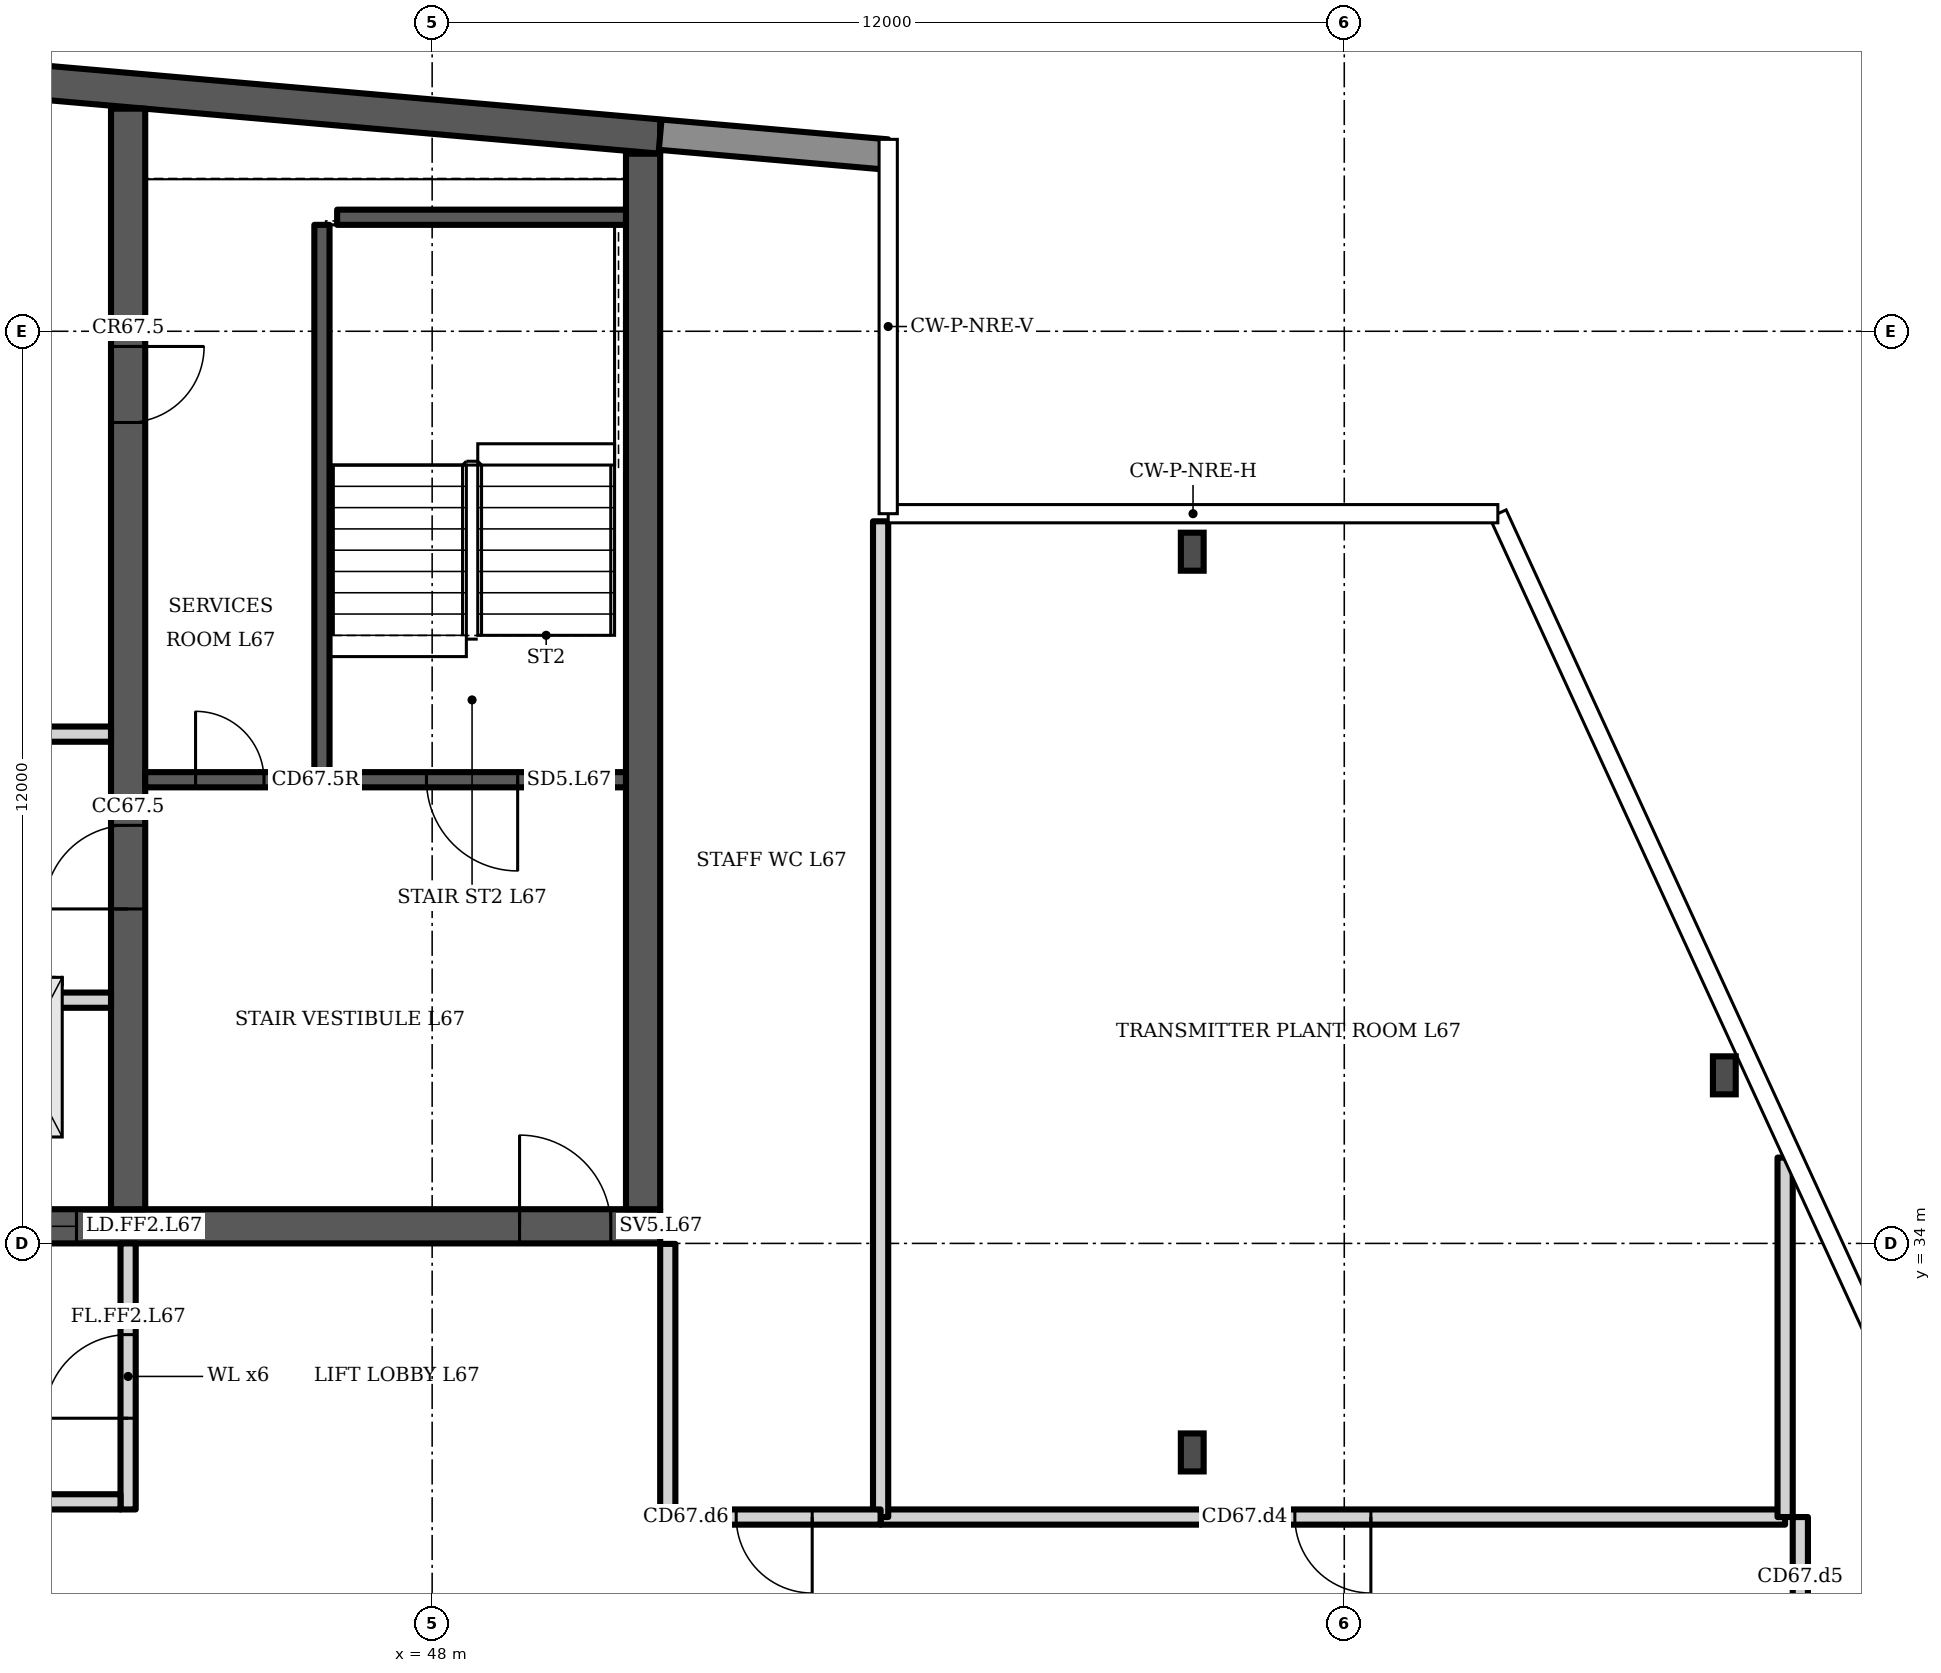
"""IFC4 building model, lengths in metres.
Left out: names, types, materials, properties, quantities, classifications, styles, units other than length and angle.
Written with IfcOpenShell. Run it as: python <this file> out.ifc"""

import sys

from ifc_helpers import new_model, si_unit, direction, frame, frame_2d, origin, origin_2d, place, context, subcontext, project, spatial, polyline, rectangle, i_section, outline, extrude, element, fill, save


model = new_model("IFC4")
c1 = context("Model", 3, precision=1e-05, world=origin(), true_north=direction((0.0, 1.0)))
c2 = subcontext(c1, "Body", "Model", "MODEL_VIEW")
j1 = project(units=[si_unit("LENGTHUNIT", "METRE"), si_unit("PLANEANGLEUNIT", "RADIAN")], contexts=[c1])
p1 = place(None, origin())
s1 = spatial("IfcSite", under=j1, at=p1, CompositionType="ELEMENT")
p2 = place(p1, origin())
s2 = spatial("IfcBuilding", under=s1, at=p2, CompositionType="ELEMENT")
p3 = place(p2, frame((0.0, 0.0, 264.3)))
s3 = spatial("IfcBuildingStorey", under=s2, at=p3, CompositionType="ELEMENT", Elevation=264.3)
p4 = place(p3, frame((0.0, 0.0, -0.0)))
e1 = element("IfcWall", 1, at=p4, inside=s3, PredefinedType="SHEAR", context=c2, shape_type="SweptSolid", body=[
    extrude(outline(polyline([(30.0, 48.948), (37.0, 49.561), (51.0, 48.336), (51.0, 48.787), (37.0, 50.012), (30.0, 49.4), (30.0, 48.948)])), origin(), (0.0, 0.0, 1.0), 1.994),
])
p5 = place(p3, frame((30.0, 34.225, 0.0), z_axis=(0.0, 0.0, 1.0), x_axis=(1.0, 0.0, 0.0)))
e2 = element("IfcWall", 2, at=p5, inside=s3, PredefinedType="SHEAR", context=c2, shape_type="SweptSolid", body=[
    extrude(outline(polyline([(0.0, 0.0), (21.0, 0.0), (21.0, 3.2), (18.375, 3.2), (15.75, 3.2), (13.125, 3.2), (10.5, 3.2), (7.875, 3.2), (5.25, 3.2), (2.625, 3.054), (0.0, 2.25), (0.0, 0.0)])), frame((0.0, 0.225, 0.0), z_axis=(0.0, -1.0, 0.0), x_axis=(1.0, 0.0, 0.0)), (0.0, 0.0, 1.0), 0.45),
])
p6 = place(p5, frame((0.792, 0.0, 0.0)))
e3 = element("IfcOpeningElement", 3, at=p6, cuts=e2, PredefinedType="OPENING", context=c2, shape_type="SweptSolid", body=[
    extrude(rectangle(XDim=1.1, YDim=2.1, at=frame_2d((0.55, 1.05))), frame((0.0, 0.235, 0.0), z_axis=(0.0, -1.0, 0.0), x_axis=(1.0, 0.0, 0.0)), (0.0, 0.0, 1.0), 0.47),
])
p7 = place(p5, frame((5.221, 0.0, 0.0)))
e4 = element("IfcOpeningElement", 4, at=p7, cuts=e2, PredefinedType="OPENING", context=c2, shape_type="SweptSolid", body=[
    extrude(rectangle(XDim=1.1, YDim=2.1, at=frame_2d((0.55, 1.05))), frame((0.0, 0.235, 0.0), z_axis=(0.0, -1.0, 0.0), x_axis=(1.0, 0.0, 0.0)), (0.0, 0.0, 1.0), 0.47),
])
p8 = place(p5, frame((2.8, 0.0, 0.0)))
e5 = element("IfcOpeningElement", 5, at=p8, cuts=e2, PredefinedType="OPENING", context=c2, shape_type="SweptSolid", body=[
    extrude(rectangle(XDim=1.4, YDim=2.1, at=frame_2d((0.7, 1.05))), frame((0.0, 0.235, 0.0), z_axis=(0.0, -1.0, 0.0), x_axis=(1.0, 0.0, 0.0)), (0.0, 0.0, 1.0), 0.47),
])
p9 = place(p5, frame((7.679, 0.0, 0.0)))
e6 = element("IfcOpeningElement", 6, at=p9, cuts=e2, PredefinedType="OPENING", context=c2, shape_type="SweptSolid", body=[
    extrude(rectangle(XDim=1.1, YDim=2.1, at=frame_2d((0.55, 1.05))), frame((0.0, 0.235, 0.0), z_axis=(0.0, -1.0, 0.0), x_axis=(1.0, 0.0, 0.0)), (0.0, 0.0, 1.0), 0.47),
])
p10 = place(p5, frame((12.221, 0.0, 0.0)))
e7 = element("IfcOpeningElement", 7, at=p10, cuts=e2, PredefinedType="OPENING", context=c2, shape_type="SweptSolid", body=[
    extrude(rectangle(XDim=1.1, YDim=2.1, at=frame_2d((0.55, 1.05))), frame((0.0, 0.235, 0.0), z_axis=(0.0, -1.0, 0.0), x_axis=(1.0, 0.0, 0.0)), (0.0, 0.0, 1.0), 0.47),
])
p11 = place(p5, frame((19.15, 0.0, 0.0)))
e8 = element("IfcOpeningElement", 8, at=p11, cuts=e2, PredefinedType="OPENING", context=c2, shape_type="SweptSolid", body=[
    extrude(rectangle(XDim=1.2, YDim=2.1, at=frame_2d((0.6, 1.05))), frame((0.0, 0.235, 0.0), z_axis=(0.0, -1.0, 0.0), x_axis=(1.0, 0.0, 0.0)), (0.0, 0.0, 1.0), 0.47),
])
p12 = place(p3, frame((44.0, 34.45, 0.0), z_axis=(0.0, 0.0, 1.0), x_axis=(0.0, 1.0, 0.0)))
e9 = element("IfcWall", 9, at=p12, inside=s3, PredefinedType="SHEAR", context=c2, shape_type="SweptSolid", body=[
    extrude(rectangle(XDim=14.479, YDim=0.45, at=frame_2d((7.239, 0.0))), origin(), (0.0, 0.0, 1.0), 3.2),
])
p13 = place(p12, frame((3.95, 0.0, 0.0)))
e10 = element("IfcOpeningElement", 10, at=p13, cuts=e9, PredefinedType="OPENING", context=c2, shape_type="SweptSolid", body=[
    extrude(rectangle(XDim=1.1, YDim=2.1, at=frame_2d((0.55, 1.05))), frame((0.0, 0.235, 0.0), z_axis=(0.0, -1.0, 0.0), x_axis=(1.0, 0.0, 0.0)), (0.0, 0.0, 1.0), 0.47),
])
p14 = place(p12, frame((10.35, 0.0, 0.0)))
e11 = element("IfcOpeningElement", 11, at=p14, cuts=e9, PredefinedType="OPENING", context=c2, shape_type="SweptSolid", body=[
    extrude(rectangle(XDim=1.0, YDim=2.1, at=frame_2d((0.5, 1.05))), frame((0.0, 0.235, 0.0), z_axis=(0.0, -1.0, 0.0), x_axis=(1.0, 0.0, 0.0)), (0.0, 0.0, 1.0), 0.47),
])
p15 = place(p3, frame((50.775, 34.45, 0.0), z_axis=(0.0, 0.0, 1.0), x_axis=(0.0, 1.0, 0.0)))
e12 = element("IfcWall", 12, at=p15, inside=s3, PredefinedType="SHEAR", context=c2, shape_type="SweptSolid", body=[
    extrude(rectangle(XDim=13.886, YDim=0.45, at=frame_2d((6.943, 0.0))), origin(), (0.0, 0.0, 1.0), 3.2),
])
for number, where, z_axis, x_axis in (
    (13, (58.0, 31.25, 0.0), (0.0, 0.0, 1.0), (1.0, 0.0, 0.0)),
    (14, (58.0, 43.1, 0.0), (0.0, 0.0, 1.0), (1.0, 0.0, 0.0)),
    (15, (65.0, 36.211, 0.0), (0.0, 0.0, 1.0), (1.0, 0.0, 0.0)),
):
    element("IfcColumn", number, at=place(p3, frame(where, z_axis=z_axis, x_axis=x_axis)), inside=s3, PredefinedType="COLUMN", context=c2, shape_type="SweptSolid", body=[
        extrude(i_section(OverallWidth=0.3, OverallDepth=0.5, WebThickness=0.014, FlangeThickness=0.028, FilletRadius=0.027, at=origin_2d()), origin(), (0.0, 0.0, 1.0), 3.2),
    ])
p16 = place(p3, frame((53.983, 48.326, 0.0), z_axis=(0.0, 0.0, 1.0), x_axis=(-0.996194, 0.087168, 0.0)))
e16 = element("IfcWall", 16, at=p16, inside=s3, PredefinedType="SOLIDWALL", context=c2, shape_type="SweptSolid", body=[
    extrude(rectangle(XDim=2.994, YDim=0.4, at=frame_2d((1.497, 0.0))), origin(), (0.0, 0.0, 1.0), 2.8),
])
p17 = place(p3, frame((37.225, 40.7, 0.0), z_axis=(0.0, 0.0, 1.0), x_axis=(1.0, 0.0, 0.0)))
e17 = element("IfcWall", 17, at=p17, inside=s3, PredefinedType="PARTITIONING", context=c2, shape_type="SweptSolid", body=[
    extrude(rectangle(XDim=6.55, YDim=0.2, at=frame_2d((3.275, 0.0))), origin(), (0.0, 0.0, 1.0), 2.8),
])
p18 = place(p17, frame((2.775, 0.0, 0.0)))
e18 = element("IfcOpeningElement", 18, at=p18, cuts=e17, PredefinedType="OPENING", context=c2, shape_type="SweptSolid", body=[
    extrude(rectangle(XDim=1.0, YDim=2.1, at=frame_2d((0.5, 1.05))), frame((0.0, 0.11, 0.0), z_axis=(0.0, -1.0, 0.0), x_axis=(1.0, 0.0, 0.0)), (0.0, 0.0, 1.0), 0.22),
])
p19 = place(p3, origin())
e19 = element("IfcWall", 19, at=p19, inside=s3, PredefinedType="PARTITIONING", context=c2, shape_type="SweptSolid", body=[
    extrude(outline(polyline([(41.567, 37.3), (41.767, 37.3), (43.775, 37.3), (43.775, 37.1), (41.767, 37.1), (41.767, 34.45), (41.567, 34.45), (41.567, 37.3)])), origin(), (0.0, 0.0, 1.0), 2.8),
])
p20 = place(p3, frame((44.225, 40.1, 0.0), z_axis=(0.0, 0.0, 1.0), x_axis=(1.0, 0.0, 0.0)))
e20 = element("IfcWall", 20, at=p20, inside=s3, PredefinedType="SHEAR", context=c2, shape_type="SweptSolid", body=[
    extrude(rectangle(XDim=6.325, YDim=0.2, at=frame_2d((3.163, 0.0))), origin(), (0.0, 0.0, 1.0), 2.8),
])
p21 = place(p20, frame((3.7, 0.0, 0.0)))
e21 = element("IfcOpeningElement", 21, at=p21, cuts=e20, PredefinedType="OPENING", context=c2, shape_type="SweptSolid", body=[
    extrude(rectangle(XDim=1.2, YDim=2.1, at=frame_2d((0.6, 1.05))), frame((0.0, 0.11, 0.0), z_axis=(0.0, -1.0, 0.0), x_axis=(1.0, 0.0, 0.0)), (0.0, 0.0, 1.0), 0.22),
])
p22 = place(p20, frame((0.663, 0.0, 0.0)))
e22 = element("IfcOpeningElement", 22, at=p22, cuts=e20, PredefinedType="OPENING", context=c2, shape_type="SweptSolid", body=[
    extrude(rectangle(XDim=0.9, YDim=2.1, at=frame_2d((0.45, 1.05))), frame((0.0, 0.11, 0.0), z_axis=(0.0, -1.0, 0.0), x_axis=(1.0, 0.0, 0.0)), (0.0, 0.0, 1.0), 0.22),
])
p23 = place(p3, frame((46.55, 40.2, 0.0), z_axis=(0.0, 0.0, 1.0), x_axis=(0.0, 1.0, 0.0)))
e23 = element("IfcWall", 23, at=p23, inside=s3, PredefinedType="SHEAR", context=c2, shape_type="SweptSolid", body=[
    extrude(rectangle(XDim=7.2, YDim=0.2, at=frame_2d((3.6, 0.0))), origin(), (0.0, 0.0, 1.0), 2.8),
])
p24 = place(p3, frame((46.75, 47.5, 0.0), z_axis=(0.0, 0.0, 1.0), x_axis=(1.0, 0.0, 0.0)))
e24 = element("IfcWall", 24, at=p24, inside=s3, PredefinedType="SHEAR", context=c2, shape_type="SweptSolid", body=[
    extrude(rectangle(XDim=3.8, YDim=0.2, at=frame_2d((1.9, 0.0))), origin(), (0.0, 0.0, 1.0), 2.8),
])
p25 = place(p3, frame((65.8, 30.4, 0.0), z_axis=(0.0, 0.0, 1.0), x_axis=(-1.0, 0.0, 0.0)))
e25 = element("IfcWall", 25, at=p25, inside=s3, PredefinedType="PARTITIONING", context=c2, shape_type="SweptSolid", body=[
    extrude(rectangle(XDim=11.9, YDim=0.2, at=frame_2d((5.95, 0.0))), origin(), (0.0, 0.0, 1.0), 2.8),
])
p26 = place(p25, frame((5.45, 0.0, 0.0)))
e26 = element("IfcOpeningElement", 26, at=p26, cuts=e25, PredefinedType="OPENING", context=c2, shape_type="SweptSolid", body=[
    extrude(rectangle(XDim=1.0, YDim=2.1, at=frame_2d((0.5, 1.05))), frame((0.0, 0.11, 0.0), z_axis=(0.0, -1.0, 0.0), x_axis=(1.0, 0.0, 0.0)), (0.0, 0.0, 1.0), 0.22),
])
p27 = place(p3, frame((65.8, 35.129, 0.0), z_axis=(0.0, 0.0, 1.0), x_axis=(0.0, -1.0, 0.0)))
e27 = element("IfcWall", 27, at=p27, inside=s3, PredefinedType="PARTITIONING", context=c2, shape_type="SweptSolid", body=[
    extrude(rectangle(XDim=4.729, YDim=0.2, at=frame_2d((2.365, 0.0))), origin(), (0.0, 0.0, 1.0), 2.8),
])
p28 = place(p3, frame((53.9, 30.4, 0.0), z_axis=(0.0, 0.0, 1.0), x_axis=(0.0, 1.0, 0.0)))
e28 = element("IfcWall", 28, at=p28, inside=s3, PredefinedType="PARTITIONING", context=c2, shape_type="SweptSolid", body=[
    extrude(rectangle(XDim=13.1, YDim=0.2, at=frame_2d((6.55, 0.0))), origin(), (0.0, 0.0, 1.0), 2.8),
])
p29 = place(p3, frame((66.0, 27.34, 0.0), z_axis=(0.0, 0.0, 1.0), x_axis=(0.0, 1.0, 0.0)))
e29 = element("IfcWall", 29, at=p29, inside=s3, PredefinedType="PARTITIONING", context=c2, shape_type="SweptSolid", body=[
    extrude(rectangle(XDim=3.06, YDim=0.2, at=frame_2d((1.53, 0.0))), origin(), (0.0, 0.0, 1.0), 2.8),
])
p30 = place(p29, frame((1.03, 0.0, 0.0)))
e30 = element("IfcOpeningElement", 30, at=p30, cuts=e29, PredefinedType="OPENING", context=c2, shape_type="SweptSolid", body=[
    extrude(rectangle(XDim=1.0, YDim=2.1, at=frame_2d((0.5, 1.05))), frame((0.0, 0.11, 0.0), z_axis=(0.0, -1.0, 0.0), x_axis=(1.0, 0.0, 0.0)), (0.0, 0.0, 1.0), 0.22),
])
p31 = place(p3, frame((53.9, 30.4, 0.0), z_axis=(0.0, 0.0, 1.0), x_axis=(-1.0, 0.0, 0.0)))
e31 = element("IfcWall", 31, at=p31, inside=s3, PredefinedType="PARTITIONING", context=c2, shape_type="SweptSolid", body=[
    extrude(rectangle(XDim=2.8, YDim=0.2, at=frame_2d((1.4, 0.0))), origin(), (0.0, 0.0, 1.0), 2.8),
])
p32 = place(p31, frame((0.9, 0.0, 0.0)))
e32 = element("IfcOpeningElement", 32, at=p32, cuts=e31, PredefinedType="OPENING", context=c2, shape_type="SweptSolid", body=[
    extrude(rectangle(XDim=1.0, YDim=2.1, at=frame_2d((0.5, 1.05))), frame((0.0, 0.11, 0.0), z_axis=(0.0, -1.0, 0.0), x_axis=(1.0, 0.0, 0.0)), (0.0, 0.0, 1.0), 0.22),
])
p33 = place(p3, frame((51.1, 30.4, 0.0), z_axis=(0.0, 0.0, 1.0), x_axis=(0.0, 1.0, 0.0)))
e33 = element("IfcWall", 33, at=p33, inside=s3, PredefinedType="PARTITIONING", context=c2, shape_type="SweptSolid", body=[
    extrude(rectangle(XDim=3.594, YDim=0.2, at=frame_2d((1.797, 0.0))), origin(), (0.0, 0.0, 1.0), 2.8),
])
p34 = place(p3, frame((44.0, 30.5, 0.0), z_axis=(0.0, 0.0, 1.0), x_axis=(0.0, 1.0, 0.0)))
e34 = element("IfcWall", 34, at=p34, inside=s3, PredefinedType="PARTITIONING", context=c2, shape_type="SweptSolid", body=[
    extrude(rectangle(XDim=3.5, YDim=0.2, at=frame_2d((1.75, 0.0))), origin(), (0.0, 0.0, 1.0), 2.8),
])
p35 = place(p34, frame((1.2, 0.0, 0.0)))
e35 = element("IfcOpeningElement", 35, at=p35, cuts=e34, PredefinedType="OPENING", context=c2, shape_type="SweptSolid", body=[
    extrude(rectangle(XDim=1.1, YDim=2.1, at=frame_2d((0.55, 1.05))), frame((0.0, 0.11, 0.0), z_axis=(0.0, -1.0, 0.0), x_axis=(1.0, 0.0, 0.0)), (0.0, 0.0, 1.0), 0.22),
])
p36 = place(p3, frame((41.1, 30.6, 0.0), z_axis=(0.0, 0.0, 1.0), x_axis=(1.0, 0.0, 0.0)))
e36 = element("IfcWall", 36, at=p36, inside=s3, PredefinedType="PARTITIONING", context=c2, shape_type="SweptSolid", body=[
    extrude(rectangle(XDim=2.8, YDim=0.2, at=frame_2d((1.4, 0.0))), origin(), (0.0, 0.0, 1.0), 2.8),
])
p37 = place(p10, origin())
e37 = element("IfcDoor", 37, at=p37, inside=s3, OperationType="DOUBLE_DOOR_SLIDING", PredefinedType="DOOR", context=c2, shape_type="SweptSolid", body=[
    extrude(rectangle(XDim=1.1, YDim=2.1, at=frame_2d((0.55, 1.05))), frame((0.0, 0.025, 0.0), z_axis=(0.0, -1.0, 0.0), x_axis=(1.0, 0.0, 0.0)), (0.0, 0.0, 1.0), 0.05),
])
fill(e7, e37)
p38 = place(p21, origin())
e38 = element("IfcDoor", 38, at=p38, inside=s3, OperationType="SINGLE_SWING_RIGHT", PredefinedType="DOOR", context=c2, shape_type="SweptSolid", body=[
    extrude(rectangle(XDim=1.2, YDim=2.1, at=frame_2d((0.6, 1.05))), frame((0.0, 0.025, 0.0), z_axis=(0.0, -1.0, 0.0), x_axis=(1.0, 0.0, 0.0)), (0.0, 0.0, 1.0), 0.05),
])
fill(e21, e38)
p39 = place(p22, origin())
e39 = element("IfcDoor", 39, at=p39, inside=s3, OperationType="SINGLE_SWING_LEFT", PredefinedType="DOOR", context=c2, shape_type="SweptSolid", body=[
    extrude(rectangle(XDim=0.9, YDim=2.1, at=frame_2d((0.45, 1.05))), frame((0.0, 0.025, 0.0), z_axis=(0.0, -1.0, 0.0), x_axis=(1.0, 0.0, 0.0)), (0.0, 0.0, 1.0), 0.05),
])
fill(e22, e39)
p40 = place(p11, origin())
e40 = element("IfcDoor", 40, at=p40, inside=s3, OperationType="SINGLE_SWING_LEFT", PredefinedType="DOOR", context=c2, shape_type="SweptSolid", body=[
    extrude(rectangle(XDim=1.2, YDim=2.1, at=frame_2d((0.6, 1.05))), frame((0.0, 0.025, 0.0), z_axis=(0.0, -1.0, 0.0), x_axis=(1.0, 0.0, 0.0)), (0.0, 0.0, 1.0), 0.05),
])
fill(e8, e40)
p41 = place(p26, origin())
e41 = element("IfcDoor", 41, at=p41, inside=s3, OperationType="SINGLE_SWING_LEFT", PredefinedType="DOOR", context=c2, shape_type="SweptSolid", body=[
    extrude(rectangle(XDim=1.0, YDim=2.1, at=frame_2d((0.5, 1.05))), frame((0.0, 0.025, 0.0), z_axis=(0.0, -1.0, 0.0), x_axis=(1.0, 0.0, 0.0)), (0.0, 0.0, 1.0), 0.05),
])
fill(e26, e41)
p42 = place(p32, origin())
e42 = element("IfcDoor", 42, at=p42, inside=s3, OperationType="SINGLE_SWING_LEFT", PredefinedType="DOOR", context=c2, shape_type="SweptSolid", body=[
    extrude(rectangle(XDim=1.0, YDim=2.1, at=frame_2d((0.5, 1.05))), frame((0.0, 0.025, 0.0), z_axis=(0.0, -1.0, 0.0), x_axis=(1.0, 0.0, 0.0)), (0.0, 0.0, 1.0), 0.05),
])
fill(e32, e42)
p43 = place(p13, origin())
e43 = element("IfcDoor", 43, at=p43, inside=s3, OperationType="SINGLE_SWING_LEFT", PredefinedType="DOOR", context=c2, shape_type="SweptSolid", body=[
    extrude(rectangle(XDim=1.1, YDim=2.1, at=frame_2d((0.55, 1.05))), frame((0.0, 0.025, 0.0), z_axis=(0.0, -1.0, 0.0), x_axis=(1.0, 0.0, 0.0)), (0.0, 0.0, 1.0), 0.05),
])
fill(e10, e43)
p44 = place(p14, origin())
e44 = element("IfcDoor", 44, at=p44, inside=s3, OperationType="SINGLE_SWING_RIGHT", PredefinedType="DOOR", context=c2, shape_type="SweptSolid", body=[
    extrude(rectangle(XDim=1.0, YDim=2.1, at=frame_2d((0.5, 1.05))), frame((0.0, 0.025, 0.0), z_axis=(0.0, -1.0, 0.0), x_axis=(1.0, 0.0, 0.0)), (0.0, 0.0, 1.0), 0.05),
])
fill(e11, e44)
p45 = place(p35, origin())
e45 = element("IfcDoor", 45, at=p45, inside=s3, OperationType="SINGLE_SWING_LEFT", PredefinedType="DOOR", context=c2, shape_type="SweptSolid", body=[
    extrude(rectangle(XDim=1.1, YDim=2.1, at=frame_2d((0.55, 1.05))), frame((0.0, 0.025, 0.0), z_axis=(0.0, -1.0, 0.0), x_axis=(1.0, 0.0, 0.0)), (0.0, 0.0, 1.0), 0.05),
])
fill(e35, e45)
save(model, sys.argv[1])
